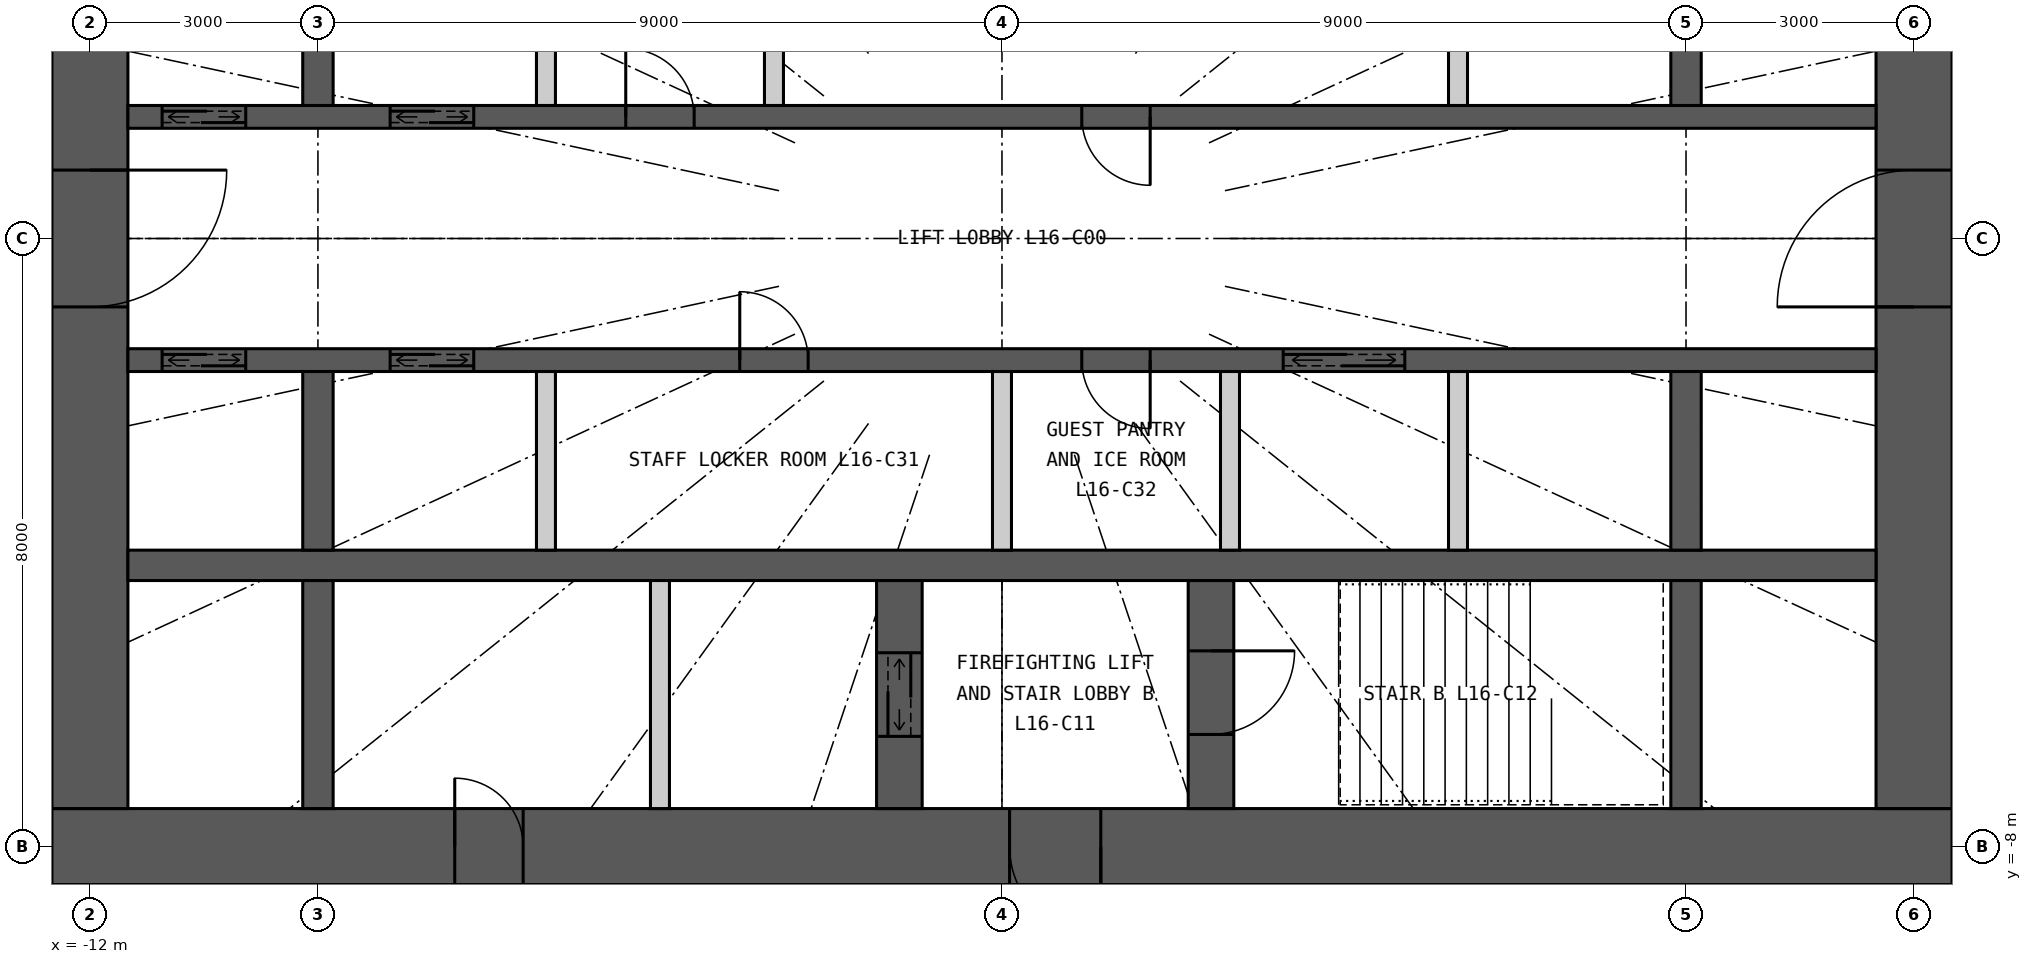
"""IFC4 building model, lengths in metres.
Left out: names, types, materials, properties, quantities, classifications, styles, units other than length and angle.
Written with IfcOpenShell. Run it as: python <this file> out.ifc"""

import sys

from ifc_helpers import new_model, si_unit, direction, frame, frame_2d, origin, place, context, subcontext, project, spatial, rectangle, extrude, element, fill, save


model = new_model("IFC4")
c1 = context("Model", 3, precision=1e-05, world=origin(), true_north=direction((0.0, 1.0)))
c2 = subcontext(c1, "Body", "Model", "MODEL_VIEW")
j1 = project(units=[si_unit("LENGTHUNIT", "METRE"), si_unit("PLANEANGLEUNIT", "RADIAN")], contexts=[c1])
p1 = place(None, origin())
s1 = spatial("IfcSite", under=j1, at=p1, CompositionType="ELEMENT")
p2 = place(p1, origin())
s2 = spatial("IfcBuilding", under=s1, at=p2, CompositionType="ELEMENT")
p3 = place(p2, frame((0.0, 0.0, 67.2)))
s3 = spatial("IfcBuildingStorey", under=s2, at=p3, CompositionType="ELEMENT", Elevation=67.2)
p4 = place(p3, frame((12.5, -8.0, 0.0), z_axis=(0.0, 0.0, 1.0), x_axis=(-1.0, 0.0, 0.0)))
e1 = element("IfcWall", 1, at=p4, inside=s3, PredefinedType="SHEAR", context=c2, shape_type="SweptSolid", body=[
    extrude(rectangle(XDim=25.0, YDim=1.0, at=frame_2d((12.5, 0.0))), origin(), (0.0, 0.0, 1.0), 3.3),
])
p5 = place(p4, frame((11.2, 0.0, 0.0)))
e2 = element("IfcOpeningElement", 2, at=p5, cuts=e1, PredefinedType="OPENING", context=c2, shape_type="SweptSolid", body=[
    extrude(rectangle(XDim=1.2, YDim=2.2, at=frame_2d((0.6, 1.1))), frame((0.0, 0.51, 0.0), z_axis=(0.0, -1.0, 0.0), x_axis=(1.0, 0.0, 0.0)), (0.0, 0.0, 1.0), 1.02),
])
p6 = place(p4, frame((18.8, 0.0, 0.0)))
e3 = element("IfcOpeningElement", 3, at=p6, cuts=e1, PredefinedType="OPENING", context=c2, shape_type="SweptSolid", body=[
    extrude(rectangle(XDim=0.9, YDim=2.2, at=frame_2d((0.45, 1.1))), frame((0.0, 0.51, 0.0), z_axis=(0.0, -1.0, 0.0), x_axis=(1.0, 0.0, 0.0)), (0.0, 0.0, 1.0), 1.02),
])
p7 = place(p3, frame((12.0, -7.5, 0.0), z_axis=(0.0, 0.0, 1.0), x_axis=(0.0, 1.0, 0.0)))
e4 = element("IfcWall", 4, at=p7, inside=s3, PredefinedType="SHEAR", context=c2, shape_type="SweptSolid", body=[
    extrude(rectangle(XDim=15.0, YDim=1.0, at=frame_2d((7.5, 0.0))), origin(), (0.0, 0.0, 1.0), 3.3),
])
p8 = place(p7, frame((6.6, 0.0, 0.0)))
e5 = element("IfcOpeningElement", 5, at=p8, cuts=e4, PredefinedType="OPENING", context=c2, shape_type="SweptSolid", body=[
    extrude(rectangle(XDim=1.8, YDim=2.2, at=frame_2d((0.9, 1.1))), frame((0.0, 0.51, 0.0), z_axis=(0.0, -1.0, 0.0), x_axis=(1.0, 0.0, 0.0)), (0.0, 0.0, 1.0), 1.02),
])
p9 = place(p3, frame((-12.0, 7.5, 0.0), z_axis=(0.0, 0.0, 1.0), x_axis=(0.0, -1.0, 0.0)))
e6 = element("IfcWall", 6, at=p9, inside=s3, PredefinedType="SHEAR", context=c2, shape_type="SweptSolid", body=[
    extrude(rectangle(XDim=15.0, YDim=1.0, at=frame_2d((7.5, 0.0))), origin(), (0.0, 0.0, 1.0), 3.3),
])
p10 = place(p9, frame((6.6, 0.0, 0.0)))
e7 = element("IfcOpeningElement", 7, at=p10, cuts=e6, PredefinedType="OPENING", context=c2, shape_type="SweptSolid", body=[
    extrude(rectangle(XDim=1.8, YDim=2.2, at=frame_2d((0.9, 1.1))), frame((0.0, 0.51, 0.0), z_axis=(0.0, -1.0, 0.0), x_axis=(1.0, 0.0, 0.0)), (0.0, 0.0, 1.0), 1.02),
])
p11 = place(p3, frame((-11.5, 1.6, 0.0), z_axis=(0.0, 0.0, 1.0), x_axis=(1.0, 0.0, 0.0)))
e8 = element("IfcWall", 8, at=p11, inside=s3, PredefinedType="SHEAR", context=c2, shape_type="SweptSolid", body=[
    extrude(rectangle(XDim=23.0, YDim=0.3, at=frame_2d((11.5, 0.0))), origin(), (0.0, 0.0, 1.0), 3.3),
])
p12 = place(p11, frame((0.45, 0.0, 0.0)))
e9 = element("IfcOpeningElement", 9, at=p12, cuts=e8, PredefinedType="OPENING", context=c2, shape_type="SweptSolid", body=[
    extrude(rectangle(XDim=1.1, YDim=2.2, at=frame_2d((0.55, 1.1))), frame((0.0, 0.16, 0.0), z_axis=(0.0, -1.0, 0.0), x_axis=(1.0, 0.0, 0.0)), (0.0, 0.0, 1.0), 0.32),
])
p13 = place(p11, frame((3.45, 0.0, 0.0)))
e10 = element("IfcOpeningElement", 10, at=p13, cuts=e8, PredefinedType="OPENING", context=c2, shape_type="SweptSolid", body=[
    extrude(rectangle(XDim=1.1, YDim=2.2, at=frame_2d((0.55, 1.1))), frame((0.0, 0.16, 0.0), z_axis=(0.0, -1.0, 0.0), x_axis=(1.0, 0.0, 0.0)), (0.0, 0.0, 1.0), 0.32),
])
p14 = place(p11, frame((6.55, 0.0, 0.0)))
e11 = element("IfcOpeningElement", 11, at=p14, cuts=e8, PredefinedType="OPENING", context=c2, shape_type="SweptSolid", body=[
    extrude(rectangle(XDim=0.9, YDim=2.2, at=frame_2d((0.45, 1.1))), frame((0.0, 0.16, 0.0), z_axis=(0.0, -1.0, 0.0), x_axis=(1.0, 0.0, 0.0)), (0.0, 0.0, 1.0), 0.32),
])
p15 = place(p11, frame((12.55, 0.0, 0.0)))
e12 = element("IfcOpeningElement", 12, at=p15, cuts=e8, PredefinedType="OPENING", context=c2, shape_type="SweptSolid", body=[
    extrude(rectangle(XDim=0.9, YDim=2.2, at=frame_2d((0.45, 1.1))), frame((0.0, 0.16, 0.0), z_axis=(0.0, -1.0, 0.0), x_axis=(1.0, 0.0, 0.0)), (0.0, 0.0, 1.0), 0.32),
])
p16 = place(p3, frame((-11.5, -4.3, 0.0), z_axis=(0.0, 0.0, 1.0), x_axis=(1.0, 0.0, 0.0)))
e13 = element("IfcWall", 13, at=p16, inside=s3, PredefinedType="SHEAR", context=c2, shape_type="SweptSolid", body=[
    extrude(rectangle(XDim=23.0, YDim=0.4, at=frame_2d((11.5, 0.0))), origin(), (0.0, 0.0, 1.0), 3.3),
])
p17 = place(p3, frame((-11.5, -1.6, 0.0), z_axis=(0.0, 0.0, 1.0), x_axis=(1.0, 0.0, 0.0)))
e14 = element("IfcWall", 14, at=p17, inside=s3, PredefinedType="SHEAR", context=c2, shape_type="SweptSolid", body=[
    extrude(rectangle(XDim=23.0, YDim=0.3, at=frame_2d((11.5, 0.0))), origin(), (0.0, 0.0, 1.0), 3.3),
])
p18 = place(p17, frame((0.45, 0.0, 0.0)))
e15 = element("IfcOpeningElement", 15, at=p18, cuts=e14, PredefinedType="OPENING", context=c2, shape_type="SweptSolid", body=[
    extrude(rectangle(XDim=1.1, YDim=2.2, at=frame_2d((0.55, 1.1))), frame((0.0, 0.16, 0.0), z_axis=(0.0, -1.0, 0.0), x_axis=(1.0, 0.0, 0.0)), (0.0, 0.0, 1.0), 0.32),
])
p19 = place(p17, frame((3.45, 0.0, 0.0)))
e16 = element("IfcOpeningElement", 16, at=p19, cuts=e14, PredefinedType="OPENING", context=c2, shape_type="SweptSolid", body=[
    extrude(rectangle(XDim=1.1, YDim=2.2, at=frame_2d((0.55, 1.1))), frame((0.0, 0.16, 0.0), z_axis=(0.0, -1.0, 0.0), x_axis=(1.0, 0.0, 0.0)), (0.0, 0.0, 1.0), 0.32),
])
p20 = place(p17, frame((15.2, 0.0, 0.0)))
e17 = element("IfcOpeningElement", 17, at=p20, cuts=e14, PredefinedType="OPENING", context=c2, shape_type="SweptSolid", body=[
    extrude(rectangle(XDim=1.6, YDim=2.4, at=frame_2d((0.8, 1.2))), frame((0.0, 0.16, 0.0), z_axis=(0.0, -1.0, 0.0), x_axis=(1.0, 0.0, 0.0)), (0.0, 0.0, 1.0), 0.32),
])
p21 = place(p17, frame((8.05, 0.0, 0.0)))
e18 = element("IfcOpeningElement", 18, at=p21, cuts=e14, PredefinedType="OPENING", context=c2, shape_type="SweptSolid", body=[
    extrude(rectangle(XDim=0.9, YDim=2.2, at=frame_2d((0.45, 1.1))), frame((0.0, 0.16, 0.0), z_axis=(0.0, -1.0, 0.0), x_axis=(1.0, 0.0, 0.0)), (0.0, 0.0, 1.0), 0.32),
])
p22 = place(p17, frame((12.55, 0.0, 0.0)))
e19 = element("IfcOpeningElement", 19, at=p22, cuts=e14, PredefinedType="OPENING", context=c2, shape_type="SweptSolid", body=[
    extrude(rectangle(XDim=0.9, YDim=2.2, at=frame_2d((0.45, 1.1))), frame((0.0, 0.16, 0.0), z_axis=(0.0, -1.0, 0.0), x_axis=(1.0, 0.0, 0.0)), (0.0, 0.0, 1.0), 0.32),
])
for number, where, z_axis, x_axis in (
    (20, (-9.0, 1.75, 0.0), (0.0, 0.0, 1.0), (0.0, 1.0, 0.0)),
    (21, (-9.0, -4.1, 0.0), (0.0, 0.0, 1.0), (0.0, 1.0, 0.0)),
):
    element("IfcWall", number, at=place(p3, frame(where, z_axis=z_axis, x_axis=x_axis)), inside=s3, PredefinedType="SHEAR", context=c2, shape_type="SweptSolid", body=[
        extrude(rectangle(XDim=2.35, YDim=0.4, at=frame_2d((1.175, 0.0))), origin(), (0.0, 0.0, 1.0), 3.3),
    ])
p23 = place(p3, frame((-9.0, -7.5, 0.0), z_axis=(0.0, 0.0, 1.0), x_axis=(0.0, 1.0, 0.0)))
e22 = element("IfcWall", 22, at=p23, inside=s3, PredefinedType="SHEAR", context=c2, shape_type="SweptSolid", body=[
    extrude(rectangle(XDim=3.0, YDim=0.4, at=frame_2d((1.5, 0.0))), origin(), (0.0, 0.0, 1.0), 3.3),
])
for number, where, z_axis, x_axis in (
    (23, (9.0, 1.75, 0.0), (0.0, 0.0, 1.0), (0.0, 1.0, 0.0)),
    (24, (9.0, -4.1, 0.0), (0.0, 0.0, 1.0), (0.0, 1.0, 0.0)),
):
    element("IfcWall", number, at=place(p3, frame(where, z_axis=z_axis, x_axis=x_axis)), inside=s3, PredefinedType="SHEAR", context=c2, shape_type="SweptSolid", body=[
        extrude(rectangle(XDim=2.35, YDim=0.4, at=frame_2d((1.175, 0.0))), origin(), (0.0, 0.0, 1.0), 3.3),
    ])
p24 = place(p3, frame((9.0, -7.5, 0.0), z_axis=(0.0, 0.0, 1.0), x_axis=(0.0, 1.0, 0.0)))
e25 = element("IfcWall", 25, at=p24, inside=s3, PredefinedType="SHEAR", context=c2, shape_type="SweptSolid", body=[
    extrude(rectangle(XDim=3.0, YDim=0.4, at=frame_2d((1.5, 0.0))), origin(), (0.0, 0.0, 1.0), 3.3),
])
p25 = place(p3, frame((2.75, -7.5, 0.0), z_axis=(0.0, 0.0, 1.0), x_axis=(0.0, 1.0, 0.0)))
e26 = element("IfcWall", 26, at=p25, inside=s3, PredefinedType="SHEAR", context=c2, shape_type="SweptSolid", body=[
    extrude(rectangle(XDim=3.0, YDim=0.6, at=frame_2d((1.5, 0.0))), origin(), (0.0, 0.0, 1.0), 3.3),
])
p26 = place(p25, frame((0.975, 0.0, 0.0)))
e27 = element("IfcOpeningElement", 27, at=p26, cuts=e26, PredefinedType="OPENING", context=c2, shape_type="SweptSolid", body=[
    extrude(rectangle(XDim=1.1, YDim=2.2, at=frame_2d((0.55, 1.1))), frame((0.0, 0.31, 0.0), z_axis=(0.0, -1.0, 0.0), x_axis=(1.0, 0.0, 0.0)), (0.0, 0.0, 1.0), 0.62),
])
p27 = place(p3, frame((-1.35, -7.5, 0.0), z_axis=(0.0, 0.0, 1.0), x_axis=(0.0, 1.0, 0.0)))
e28 = element("IfcWall", 28, at=p27, inside=s3, PredefinedType="SHEAR", context=c2, shape_type="SweptSolid", body=[
    extrude(rectangle(XDim=3.0, YDim=0.6, at=frame_2d((1.5, 0.0))), origin(), (0.0, 0.0, 1.0), 3.3),
])
p28 = place(p27, frame((0.95, 0.0, 0.0)))
e29 = element("IfcOpeningElement", 29, at=p28, cuts=e28, PredefinedType="OPENING", context=c2, shape_type="SweptSolid", body=[
    extrude(rectangle(XDim=1.1, YDim=2.2, at=frame_2d((0.55, 1.1))), frame((0.0, 0.31, 0.0), z_axis=(0.0, -1.0, 0.0), x_axis=(1.0, 0.0, 0.0)), (0.0, 0.0, 1.0), 0.62),
])
p29 = place(p3, frame((-4.5, -7.5, 0.0), z_axis=(0.0, 0.0, 1.0), x_axis=(0.0, 1.0, 0.0)))
e30 = element("IfcWall", 30, at=p29, inside=s3, PredefinedType="PARTITIONING", context=c2, shape_type="SweptSolid", body=[
    extrude(rectangle(XDim=3.0, YDim=0.25, at=frame_2d((1.5, 0.0))), origin(), (0.0, 0.0, 1.0), 3.3),
])
for number, where, z_axis, x_axis in (
    (31, (-6.0, 1.75, 0.0), (0.0, 0.0, 1.0), (0.0, 1.0, 0.0)),
    (32, (-3.0, 1.75, 0.0), (0.0, 0.0, 1.0), (0.0, 1.0, 0.0)),
    (33, (6.0, 1.75, 0.0), (0.0, 0.0, 1.0), (0.0, 1.0, 0.0)),
    (34, (-6.0, -4.1, 0.0), (0.0, 0.0, 1.0), (0.0, 1.0, 0.0)),
    (35, (0.0, -4.1, 0.0), (0.0, 0.0, 1.0), (0.0, 1.0, 0.0)),
    (36, (3.0, -4.1, 0.0), (0.0, 0.0, 1.0), (0.0, 1.0, 0.0)),
    (37, (6.0, -4.1, 0.0), (0.0, 0.0, 1.0), (0.0, 1.0, 0.0)),
):
    element("IfcWall", number, at=place(p3, frame(where, z_axis=z_axis, x_axis=x_axis)), inside=s3, PredefinedType="PARTITIONING", context=c2, shape_type="SweptSolid", body=[
        extrude(rectangle(XDim=2.35, YDim=0.25, at=frame_2d((1.175, 0.0))), origin(), (0.0, 0.0, 1.0), 3.3),
    ])
p30 = place(p5, origin())
e38 = element("IfcDoor", 38, at=p30, inside=s3, OperationType="SINGLE_SWING_LEFT", PredefinedType="DOOR", context=c2, shape_type="SweptSolid", body=[
    extrude(rectangle(XDim=1.2, YDim=2.2, at=frame_2d((0.6, 1.1))), frame((0.0, 0.025, 0.0), z_axis=(0.0, -1.0, 0.0), x_axis=(1.0, 0.0, 0.0)), (0.0, 0.0, 1.0), 0.05),
])
fill(e2, e38)
p31 = place(p26, origin())
e39 = element("IfcDoor", 39, at=p31, inside=s3, OperationType="SINGLE_SWING_RIGHT", PredefinedType="DOOR", context=c2, shape_type="SweptSolid", body=[
    extrude(rectangle(XDim=1.1, YDim=2.2, at=frame_2d((0.55, 1.1))), frame((0.0, 0.025, 0.0), z_axis=(0.0, -1.0, 0.0), x_axis=(1.0, 0.0, 0.0)), (0.0, 0.0, 1.0), 0.05),
])
fill(e27, e39)
p32 = place(p28, origin())
e40 = element("IfcDoor", 40, at=p32, inside=s3, OperationType="DOUBLE_DOOR_SLIDING", PredefinedType="DOOR", context=c2, shape_type="SweptSolid", body=[
    extrude(rectangle(XDim=1.1, YDim=2.2, at=frame_2d((0.55, 1.1))), frame((0.0, 0.025, 0.0), z_axis=(0.0, -1.0, 0.0), x_axis=(1.0, 0.0, 0.0)), (0.0, 0.0, 1.0), 0.05),
])
fill(e29, e40)
p33 = place(p6, origin())
e41 = element("IfcDoor", 41, at=p33, inside=s3, OperationType="SINGLE_SWING_RIGHT", PredefinedType="DOOR", context=c2, shape_type="SweptSolid", body=[
    extrude(rectangle(XDim=0.9, YDim=2.2, at=frame_2d((0.45, 1.1))), frame((0.0, 0.025, 0.0), z_axis=(0.0, -1.0, 0.0), x_axis=(1.0, 0.0, 0.0)), (0.0, 0.0, 1.0), 0.05),
])
fill(e3, e41)
p34 = place(p12, origin())
e42 = element("IfcDoor", 42, at=p34, inside=s3, OperationType="DOUBLE_DOOR_SLIDING", PredefinedType="DOOR", context=c2, shape_type="SweptSolid", body=[
    extrude(rectangle(XDim=1.1, YDim=2.2, at=frame_2d((0.55, 1.1))), frame((0.0, 0.025, 0.0), z_axis=(0.0, -1.0, 0.0), x_axis=(1.0, 0.0, 0.0)), (0.0, 0.0, 1.0), 0.05),
])
fill(e9, e42)
p35 = place(p13, origin())
e43 = element("IfcDoor", 43, at=p35, inside=s3, OperationType="DOUBLE_DOOR_SLIDING", PredefinedType="DOOR", context=c2, shape_type="SweptSolid", body=[
    extrude(rectangle(XDim=1.1, YDim=2.2, at=frame_2d((0.55, 1.1))), frame((0.0, 0.025, 0.0), z_axis=(0.0, -1.0, 0.0), x_axis=(1.0, 0.0, 0.0)), (0.0, 0.0, 1.0), 0.05),
])
fill(e10, e43)
p36 = place(p18, origin())
e44 = element("IfcDoor", 44, at=p36, inside=s3, OperationType="DOUBLE_DOOR_SLIDING", PredefinedType="DOOR", context=c2, shape_type="SweptSolid", body=[
    extrude(rectangle(XDim=1.1, YDim=2.2, at=frame_2d((0.55, 1.1))), frame((0.0, 0.025, 0.0), z_axis=(0.0, -1.0, 0.0), x_axis=(1.0, 0.0, 0.0)), (0.0, 0.0, 1.0), 0.05),
])
fill(e15, e44)
p37 = place(p19, origin())
e45 = element("IfcDoor", 45, at=p37, inside=s3, OperationType="DOUBLE_DOOR_SLIDING", PredefinedType="DOOR", context=c2, shape_type="SweptSolid", body=[
    extrude(rectangle(XDim=1.1, YDim=2.2, at=frame_2d((0.55, 1.1))), frame((0.0, 0.025, 0.0), z_axis=(0.0, -1.0, 0.0), x_axis=(1.0, 0.0, 0.0)), (0.0, 0.0, 1.0), 0.05),
])
fill(e16, e45)
p38 = place(p20, origin())
e46 = element("IfcDoor", 46, at=p38, inside=s3, OperationType="DOUBLE_DOOR_SLIDING", PredefinedType="DOOR", context=c2, shape_type="SweptSolid", body=[
    extrude(rectangle(XDim=1.6, YDim=2.4, at=frame_2d((0.8, 1.2))), frame((0.0, 0.025, 0.0), z_axis=(0.0, -1.0, 0.0), x_axis=(1.0, 0.0, 0.0)), (0.0, 0.0, 1.0), 0.05),
])
fill(e17, e46)
p39 = place(p14, origin())
e47 = element("IfcDoor", 47, at=p39, inside=s3, OperationType="SINGLE_SWING_LEFT", PredefinedType="DOOR", context=c2, shape_type="SweptSolid", body=[
    extrude(rectangle(XDim=0.9, YDim=2.2, at=frame_2d((0.45, 1.1))), frame((0.0, 0.025, 0.0), z_axis=(0.0, -1.0, 0.0), x_axis=(1.0, 0.0, 0.0)), (0.0, 0.0, 1.0), 0.05),
])
fill(e11, e47)
p40 = place(p15, origin())
e48 = element("IfcDoor", 48, at=p40, inside=s3, OperationType="SINGLE_SWING_RIGHT", PredefinedType="DOOR", context=c2, shape_type="SweptSolid", body=[
    extrude(rectangle(XDim=0.9, YDim=2.2, at=frame_2d((0.45, 1.1))), frame((0.0, 0.025, 0.0), z_axis=(0.0, -1.0, 0.0), x_axis=(1.0, 0.0, 0.0)), (0.0, 0.0, 1.0), 0.05),
])
fill(e12, e48)
p41 = place(p21, origin())
e49 = element("IfcDoor", 49, at=p41, inside=s3, OperationType="SINGLE_SWING_LEFT", PredefinedType="DOOR", context=c2, shape_type="SweptSolid", body=[
    extrude(rectangle(XDim=0.9, YDim=2.2, at=frame_2d((0.45, 1.1))), frame((0.0, 0.025, 0.0), z_axis=(0.0, -1.0, 0.0), x_axis=(1.0, 0.0, 0.0)), (0.0, 0.0, 1.0), 0.05),
])
fill(e18, e49)
p42 = place(p22, origin())
e50 = element("IfcDoor", 50, at=p42, inside=s3, OperationType="SINGLE_SWING_RIGHT", PredefinedType="DOOR", context=c2, shape_type="SweptSolid", body=[
    extrude(rectangle(XDim=0.9, YDim=2.2, at=frame_2d((0.45, 1.1))), frame((0.0, 0.025, 0.0), z_axis=(0.0, -1.0, 0.0), x_axis=(1.0, 0.0, 0.0)), (0.0, 0.0, 1.0), 0.05),
])
fill(e19, e50)
p43 = place(p8, origin())
e51 = element("IfcDoor", 51, at=p43, inside=s3, OperationType="DOUBLE_DOOR_DOUBLE_SWING", PredefinedType="DOOR", context=c2, shape_type="SweptSolid", body=[
    extrude(rectangle(XDim=1.8, YDim=2.2, at=frame_2d((0.9, 1.1))), frame((0.0, 0.025, 0.0), z_axis=(0.0, -1.0, 0.0), x_axis=(1.0, 0.0, 0.0)), (0.0, 0.0, 1.0), 0.05),
])
fill(e5, e51)
p44 = place(p10, origin())
e52 = element("IfcDoor", 52, at=p44, inside=s3, OperationType="DOUBLE_DOOR_DOUBLE_SWING", PredefinedType="DOOR", context=c2, shape_type="SweptSolid", body=[
    extrude(rectangle(XDim=1.8, YDim=2.2, at=frame_2d((0.9, 1.1))), frame((0.0, 0.025, 0.0), z_axis=(0.0, -1.0, 0.0), x_axis=(1.0, 0.0, 0.0)), (0.0, 0.0, 1.0), 0.05),
])
fill(e7, e52)
save(model, sys.argv[1])
